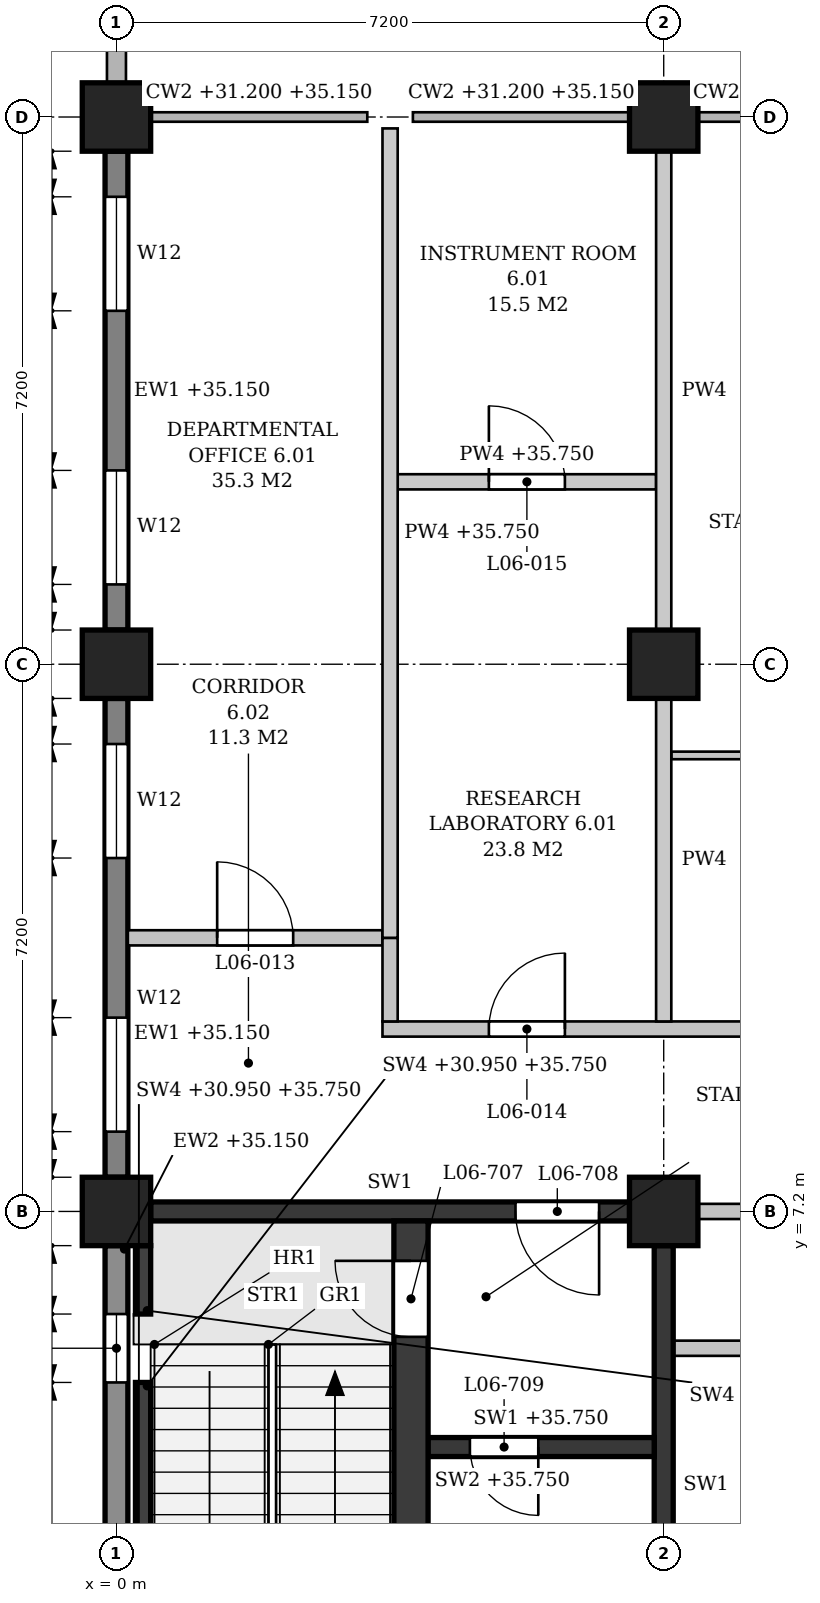
"""IFC4 building model, lengths in metres.
Left out: names, types, materials, properties, quantities, classifications, styles, units other than length and angle.
Written with IfcOpenShell. Run it as: python <this file> out.ifc"""

import sys

from ifc_helpers import new_model, si_unit, direction, frame, frame_2d, origin, origin_2d, place, context, subcontext, project, spatial, polyline, rectangle, outline, extrude, element, fill, save


model = new_model("IFC4")
c1 = context("Model", 3, precision=1e-05, world=origin(), true_north=direction((0.0, 1.0)))
c2 = subcontext(c1, "Body", "Model", "MODEL_VIEW")
j1 = project(units=[si_unit("LENGTHUNIT", "METRE"), si_unit("PLANEANGLEUNIT", "RADIAN")], contexts=[c1])
p1 = place(None, origin())
s1 = spatial("IfcSite", under=j1, at=p1, CompositionType="ELEMENT")
p2 = place(p1, origin())
s2 = spatial("IfcBuilding", under=s1, at=p2, CompositionType="ELEMENT")
p3 = place(p2, frame((0.0, 0.0, 31.2)))
s3 = spatial("IfcBuildingStorey", under=s2, at=p3, CompositionType="ELEMENT", Elevation=31.2)
for number, where, z_axis, x_axis in (
    (1, (0.0, 7.2, 0.0), (0.0, 0.0, 1.0), (1.0, 0.0, 0.0)),
    (2, (0.0, 14.4, 0.0), (0.0, 0.0, 1.0), (1.0, 0.0, 0.0)),
    (3, (0.0, 21.6, 0.0), (0.0, 0.0, 1.0), (1.0, 0.0, 0.0)),
    (4, (7.2, 7.2, 0.0), (0.0, 0.0, 1.0), (1.0, 0.0, 0.0)),
    (5, (7.2, 14.4, 0.0), (0.0, 0.0, 1.0), (1.0, 0.0, 0.0)),
    (6, (7.2, 21.6, 0.0), (0.0, 0.0, 1.0), (1.0, 0.0, 0.0)),
):
    element("IfcColumn", number, at=place(p3, frame(where, z_axis=z_axis, x_axis=x_axis)), inside=s3, PredefinedType="COLUMN", context=c2, shape_type="SweptSolid", body=[
        extrude(rectangle(XDim=0.9, YDim=0.9, at=origin_2d()), origin(), (0.0, 0.0, 1.0), 4.8),
    ])
p4 = place(p3, frame((0.0, 0.45, 0.0), z_axis=(0.0, 0.0, 1.0), x_axis=(0.0, 1.0, 0.0)))
e7 = element("IfcWall", 7, at=p4, inside=s3, PredefinedType="STANDARD", context=c2, shape_type="SweptSolid", body=[
    extrude(rectangle(XDim=6.3, YDim=0.3, at=frame_2d((3.15, 0.0))), origin(), (0.0, 0.0, 1.0), 3.95),
])
p5 = place(p4, frame((0.9, 0.0, 0.9)))
e8 = element("IfcOpeningElement", 8, at=p5, cuts=e7, PredefinedType="OPENING", context=c2, shape_type="SweptSolid", body=[
    extrude(outline(polyline([(0.0, 0.0), (0.9, 0.0), (0.9, 2.05), (0.45, 2.5), (0.0, 2.05), (0.0, 0.0)])), frame((0.0, 0.16, 0.0), z_axis=(0.0, -1.0, 0.0), x_axis=(1.0, 0.0, 0.0)), (0.0, 0.0, 1.0), 0.32),
])
p6 = place(p4, frame((4.5, 0.0, 0.9)))
e9 = element("IfcOpeningElement", 9, at=p6, cuts=e7, PredefinedType="OPENING", context=c2, shape_type="SweptSolid", body=[
    extrude(outline(polyline([(0.0, 0.0), (0.9, 0.0), (0.9, 2.05), (0.45, 2.5), (0.0, 2.05), (0.0, 0.0)])), frame((0.0, 0.16, 0.0), z_axis=(0.0, -1.0, 0.0), x_axis=(1.0, 0.0, 0.0)), (0.0, 0.0, 1.0), 0.32),
])
p7 = place(p3, frame((0.0, 7.65, 0.0), z_axis=(0.0, 0.0, 1.0), x_axis=(0.0, 1.0, 0.0)))
e10 = element("IfcWall", 10, at=p7, inside=s3, PredefinedType="STANDARD", context=c2, shape_type="SweptSolid", body=[
    extrude(rectangle(XDim=6.3, YDim=0.3, at=frame_2d((3.15, 0.0))), origin(), (0.0, 0.0, 1.0), 3.95),
])
p8 = place(p7, frame((0.6, 0.0, 0.9)))
e11 = element("IfcOpeningElement", 11, at=p8, cuts=e10, PredefinedType="OPENING", context=c2, shape_type="SweptSolid", body=[
    extrude(outline(polyline([(0.0, 0.0), (1.5, 0.0), (1.5, 1.75), (0.75, 2.5), (0.0, 1.75), (0.0, 0.0)])), frame((0.0, 0.16, 0.0), z_axis=(0.0, -1.0, 0.0), x_axis=(1.0, 0.0, 0.0)), (0.0, 0.0, 1.0), 0.32),
])
p9 = place(p7, frame((4.2, 0.0, 0.9)))
e12 = element("IfcOpeningElement", 12, at=p9, cuts=e10, PredefinedType="OPENING", context=c2, shape_type="SweptSolid", body=[
    extrude(outline(polyline([(0.0, 0.0), (1.5, 0.0), (1.5, 1.75), (0.75, 2.5), (0.0, 1.75), (0.0, 0.0)])), frame((0.0, 0.16, 0.0), z_axis=(0.0, -1.0, 0.0), x_axis=(1.0, 0.0, 0.0)), (0.0, 0.0, 1.0), 0.32),
])
p10 = place(p3, frame((0.0, 14.85, 0.0), z_axis=(0.0, 0.0, 1.0), x_axis=(0.0, 1.0, 0.0)))
e13 = element("IfcWall", 13, at=p10, inside=s3, PredefinedType="STANDARD", context=c2, shape_type="SweptSolid", body=[
    extrude(rectangle(XDim=6.3, YDim=0.3, at=frame_2d((3.15, 0.0))), origin(), (0.0, 0.0, 1.0), 3.95),
])
p11 = place(p10, frame((0.6, 0.0, 0.9)))
e14 = element("IfcOpeningElement", 14, at=p11, cuts=e13, PredefinedType="OPENING", context=c2, shape_type="SweptSolid", body=[
    extrude(outline(polyline([(0.0, 0.0), (1.5, 0.0), (1.5, 1.75), (0.75, 2.5), (0.0, 1.75), (0.0, 0.0)])), frame((0.0, 0.16, 0.0), z_axis=(0.0, -1.0, 0.0), x_axis=(1.0, 0.0, 0.0)), (0.0, 0.0, 1.0), 0.32),
])
p12 = place(p10, frame((4.2, 0.0, 0.9)))
e15 = element("IfcOpeningElement", 15, at=p12, cuts=e13, PredefinedType="OPENING", context=c2, shape_type="SweptSolid", body=[
    extrude(outline(polyline([(0.0, 0.0), (1.5, 0.0), (1.5, 1.75), (0.75, 2.5), (0.0, 1.75), (0.0, 0.0)])), frame((0.0, 0.16, 0.0), z_axis=(0.0, -1.0, 0.0), x_axis=(1.0, 0.0, 0.0)), (0.0, 0.0, 1.0), 0.32),
])
p13 = place(p3, frame((0.45, 7.2, 0.0), z_axis=(0.0, 0.0, 1.0), x_axis=(1.0, 0.0, 0.0)))
e16 = element("IfcWall", 16, at=p13, inside=s3, PredefinedType="SHEAR", context=c2, shape_type="SweptSolid", body=[
    extrude(rectangle(XDim=6.3, YDim=0.25, at=frame_2d((3.15, 0.0))), origin(), (0.0, 0.0, 1.0), 3.8),
])
p14 = place(p13, frame((4.8, 0.0, 0.0)))
e17 = element("IfcOpeningElement", 17, at=p14, cuts=e16, PredefinedType="OPENING", context=c2, shape_type="SweptSolid", body=[
    extrude(rectangle(XDim=1.1, YDim=2.1, at=frame_2d((0.55, 1.05))), frame((0.0, 0.135, 0.0), z_axis=(0.0, -1.0, 0.0), x_axis=(1.0, 0.0, 0.0)), (0.0, 0.0, 1.0), 0.27),
])
p15 = place(p3, frame((7.2, 0.45, 0.0), z_axis=(0.0, 0.0, 1.0), x_axis=(0.0, 1.0, 0.0)))
e18 = element("IfcWall", 18, at=p15, inside=s3, PredefinedType="SHEAR", context=c2, shape_type="SweptSolid", body=[
    extrude(rectangle(XDim=6.3, YDim=0.25, at=frame_2d((3.15, 0.0))), origin(), (0.0, 0.0, 1.0), 3.8),
])
p16 = place(p3, frame((0.35, 2.25, -0.25), z_axis=(0.0, 0.0, 1.0), x_axis=(0.0, 1.0, 0.0)))
e19 = element("IfcWall", 19, at=p16, inside=s3, PredefinedType="SHEAR", context=c2, shape_type="SweptSolid", body=[
    extrude(rectangle(XDim=2.7, YDim=0.2, at=frame_2d((1.35, 0.0))), origin(), (0.0, 0.0, 1.0), 4.8),
])
p17 = place(p3, frame((0.35, 5.85, -0.25), z_axis=(0.0, 0.0, 1.0), x_axis=(0.0, 1.0, 0.0)))
e20 = element("IfcWall", 20, at=p17, inside=s3, PredefinedType="SHEAR", context=c2, shape_type="SweptSolid", body=[
    extrude(rectangle(XDim=0.9, YDim=0.2, at=frame_2d((0.45, 0.0))), origin(), (0.0, 0.0, 1.0), 4.8),
])
p18 = place(p3, frame((3.875, 0.225, 0.0), z_axis=(0.0, 0.0, 1.0), x_axis=(0.0, 1.0, 0.0)))
e21 = element("IfcWall", 21, at=p18, inside=s3, PredefinedType="SHEAR", context=c2, shape_type="SweptSolid", body=[
    extrude(rectangle(XDim=6.85, YDim=0.45, at=frame_2d((3.425, 0.0))), origin(), (0.0, 0.0, 1.0), 4.55),
])
p19 = place(p18, frame((5.325, 0.0, 0.0)))
e22 = element("IfcOpeningElement", 22, at=p19, cuts=e21, PredefinedType="OPENING", context=c2, shape_type="SweptSolid", body=[
    extrude(rectangle(XDim=1.0, YDim=2.1, at=frame_2d((0.5, 1.05))), frame((0.0, 0.235, 0.0), z_axis=(0.0, -1.0, 0.0), x_axis=(1.0, 0.0, 0.0)), (0.0, 0.0, 1.0), 0.47),
])
p20 = place(p3, frame((4.1, 4.1, 0.0), z_axis=(0.0, 0.0, 1.0), x_axis=(1.0, 0.0, 0.0)))
e23 = element("IfcWall", 23, at=p20, inside=s3, PredefinedType="SHEAR", context=c2, shape_type="SweptSolid", body=[
    extrude(rectangle(XDim=2.975, YDim=0.25, at=frame_2d((1.487, 0.0))), origin(), (0.0, 0.0, 1.0), 4.55),
])
p21 = place(p20, frame((0.55, 0.0, 0.0)))
e24 = element("IfcOpeningElement", 24, at=p21, cuts=e23, PredefinedType="OPENING", context=c2, shape_type="SweptSolid", body=[
    extrude(rectangle(XDim=0.9, YDim=2.1, at=frame_2d((0.45, 1.05))), frame((0.0, 0.135, 0.0), z_axis=(0.0, -1.0, 0.0), x_axis=(1.0, 0.0, 0.0)), (0.0, 0.0, 1.0), 0.27),
])
p22 = place(p3, frame((7.325, 5.4, 0.0), z_axis=(0.0, 0.0, 1.0), x_axis=(1.0, 0.0, 0.0)))
e25 = element("IfcWall", 25, at=p22, inside=s3, PredefinedType="PARTITIONING", context=c2, shape_type="SweptSolid", body=[
    extrude(outline(polyline([(0.0, 0.0), (14.15, 0.0), (14.15, 3.8), (14.025, 3.8), (14.025, 4.55), (7.325, 4.55), (7.325, 3.8), (6.825, 3.8), (6.825, 4.55), (0.125, 4.55), (0.125, 3.8), (0.0, 3.8), (0.0, 0.0)])), frame((0.0, 0.1, 0.0), z_axis=(0.0, -1.0, 0.0), x_axis=(1.0, 0.0, 0.0)), (0.0, 0.0, 1.0), 0.2),
])
p23 = place(p22, frame((1.238, 0.0, 0.0)))
e26 = element("IfcOpeningElement", 26, at=p23, cuts=e25, PredefinedType="OPENING", context=c2, shape_type="SweptSolid", body=[
    extrude(rectangle(XDim=1.0, YDim=2.1, at=frame_2d((0.5, 1.05))), frame((0.0, 0.11, 0.0), z_axis=(0.0, -1.0, 0.0), x_axis=(1.0, 0.0, 0.0)), (0.0, 0.0, 1.0), 0.22),
])
p24 = place(p22, frame((4.775, 0.0, 0.0)))
e27 = element("IfcOpeningElement", 27, at=p24, cuts=e25, PredefinedType="OPENING", context=c2, shape_type="SweptSolid", body=[
    extrude(rectangle(XDim=1.0, YDim=2.1, at=frame_2d((0.5, 1.05))), frame((0.0, 0.11, 0.0), z_axis=(0.0, -1.0, 0.0), x_axis=(1.0, 0.0, 0.0)), (0.0, 0.0, 1.0), 0.22),
])
p25 = place(p22, frame((8.375, 0.0, 0.0)))
e28 = element("IfcOpeningElement", 28, at=p25, cuts=e25, PredefinedType="OPENING", context=c2, shape_type="SweptSolid", body=[
    extrude(rectangle(XDim=1.0, YDim=2.1, at=frame_2d((0.5, 1.05))), frame((0.0, 0.11, 0.0), z_axis=(0.0, -1.0, 0.0), x_axis=(1.0, 0.0, 0.0)), (0.0, 0.0, 1.0), 0.22),
])
p26 = place(p22, frame((11.913, 0.0, 0.0)))
e29 = element("IfcOpeningElement", 29, at=p26, cuts=e25, PredefinedType="OPENING", context=c2, shape_type="SweptSolid", body=[
    extrude(rectangle(XDim=1.0, YDim=2.1, at=frame_2d((0.5, 1.05))), frame((0.0, 0.11, 0.0), z_axis=(0.0, -1.0, 0.0), x_axis=(1.0, 0.0, 0.0)), (0.0, 0.0, 1.0), 0.22),
])
p27 = place(p3, frame((7.65, 7.2, 0.0), z_axis=(0.0, 0.0, 1.0), x_axis=(1.0, 0.0, 0.0)))
e30 = element("IfcWall", 30, at=p27, inside=s3, PredefinedType="PARTITIONING", context=c2, shape_type="SweptSolid", body=[
    extrude(rectangle(XDim=6.3, YDim=0.2, at=frame_2d((3.15, 0.0))), origin(), (0.0, 0.0, 1.0), 3.8),
])
p28 = place(p27, frame((2.65, 0.0, 0.0)))
e31 = element("IfcOpeningElement", 31, at=p28, cuts=e30, PredefinedType="OPENING", context=c2, shape_type="SweptSolid", body=[
    extrude(rectangle(XDim=1.0, YDim=2.1, at=frame_2d((0.5, 1.05))), frame((0.0, 0.11, 0.0), z_axis=(0.0, -1.0, 0.0), x_axis=(1.0, 0.0, 0.0)), (0.0, 0.0, 1.0), 0.22),
])
p29 = place(p3, frame((3.5, 9.6, 0.0), z_axis=(0.0, 0.0, 1.0), x_axis=(1.0, 0.0, 0.0)))
e32 = element("IfcWall", 32, at=p29, inside=s3, PredefinedType="PARTITIONING", context=c2, shape_type="SweptSolid", body=[
    extrude(outline(polyline([(0.0, 0.0), (14.6, 0.0), (14.6, 4.55), (11.15, 4.55), (11.15, 3.8), (10.65, 3.8), (10.65, 4.55), (3.95, 4.55), (3.95, 3.8), (3.45, 3.8), (3.45, 4.55), (0.0, 4.55), (0.0, 0.0)])), frame((0.0, 0.1, 0.0), z_axis=(0.0, -1.0, 0.0), x_axis=(1.0, 0.0, 0.0)), (0.0, 0.0, 1.0), 0.2),
])
p30 = place(p29, frame((1.4, 0.0, 0.0)))
e33 = element("IfcOpeningElement", 33, at=p30, cuts=e32, PredefinedType="OPENING", context=c2, shape_type="SweptSolid", body=[
    extrude(rectangle(XDim=1.0, YDim=2.1, at=frame_2d((0.5, 1.05))), frame((0.0, 0.11, 0.0), z_axis=(0.0, -1.0, 0.0), x_axis=(1.0, 0.0, 0.0)), (0.0, 0.0, 1.0), 0.22),
])
p31 = place(p29, frame((8.6, 0.0, 0.0)))
e34 = element("IfcOpeningElement", 34, at=p31, cuts=e32, PredefinedType="OPENING", context=c2, shape_type="SweptSolid", body=[
    extrude(rectangle(XDim=1.0, YDim=2.1, at=frame_2d((0.5, 1.05))), frame((0.0, 0.11, 0.0), z_axis=(0.0, -1.0, 0.0), x_axis=(1.0, 0.0, 0.0)), (0.0, 0.0, 1.0), 0.22),
])
p32 = place(p3, frame((0.15, 10.8, 0.0), z_axis=(0.0, 0.0, 1.0), x_axis=(1.0, 0.0, 0.0)))
e35 = element("IfcWall", 35, at=p32, inside=s3, PredefinedType="PARTITIONING", context=c2, shape_type="SweptSolid", body=[
    extrude(outline(polyline([(0.0, 0.0), (3.35, 0.0), (3.35, 4.55), (0.1, 4.55), (0.1, 3.95), (0.0, 3.95), (0.0, 0.0)])), frame((0.0, 0.1, 0.0), z_axis=(0.0, -1.0, 0.0), x_axis=(1.0, 0.0, 0.0)), (0.0, 0.0, 1.0), 0.2),
])
p33 = place(p32, frame((1.175, 0.0, 0.0)))
e36 = element("IfcOpeningElement", 36, at=p33, cuts=e35, PredefinedType="OPENING", context=c2, shape_type="SweptSolid", body=[
    extrude(rectangle(XDim=1.0, YDim=2.1, at=frame_2d((0.5, 1.05))), frame((0.0, 0.11, 0.0), z_axis=(0.0, -1.0, 0.0), x_axis=(1.0, 0.0, 0.0)), (0.0, 0.0, 1.0), 0.22),
])
p34 = place(p3, frame((7.3, 13.2, 0.0), z_axis=(0.0, 0.0, 1.0), x_axis=(1.0, 0.0, 0.0)))
e37 = element("IfcWall", 37, at=p34, inside=s3, PredefinedType="PARTITIONING", context=c2, shape_type="SweptSolid", body=[
    extrude(rectangle(XDim=10.6, YDim=0.1, at=frame_2d((5.3, 0.0))), origin(), (0.0, 0.0, 1.0), 3.8),
])
p35 = place(p34, frame((1.25, 0.0, 0.0)))
e38 = element("IfcOpeningElement", 38, at=p35, cuts=e37, PredefinedType="OPENING", context=c2, shape_type="SweptSolid", body=[
    extrude(rectangle(XDim=1.0, YDim=2.1, at=frame_2d((0.5, 1.05))), frame((0.0, 0.06, 0.0), z_axis=(0.0, -1.0, 0.0), x_axis=(1.0, 0.0, 0.0)), (0.0, 0.0, 1.0), 0.12),
])
p36 = place(p34, frame((4.8, 0.0, 0.0)))
e39 = element("IfcOpeningElement", 39, at=p36, cuts=e37, PredefinedType="OPENING", context=c2, shape_type="SweptSolid", body=[
    extrude(rectangle(XDim=1.0, YDim=2.1, at=frame_2d((0.5, 1.05))), frame((0.0, 0.06, 0.0), z_axis=(0.0, -1.0, 0.0), x_axis=(1.0, 0.0, 0.0)), (0.0, 0.0, 1.0), 0.12),
])
p37 = place(p34, frame((8.35, 0.0, 0.0)))
e40 = element("IfcOpeningElement", 40, at=p37, cuts=e37, PredefinedType="OPENING", context=c2, shape_type="SweptSolid", body=[
    extrude(rectangle(XDim=1.0, YDim=2.1, at=frame_2d((0.5, 1.05))), frame((0.0, 0.06, 0.0), z_axis=(0.0, -1.0, 0.0), x_axis=(1.0, 0.0, 0.0)), (0.0, 0.0, 1.0), 0.12),
])
p38 = place(p3, frame((3.7, 16.8, 0.0), z_axis=(0.0, 0.0, 1.0), x_axis=(1.0, 0.0, 0.0)))
e41 = element("IfcWall", 41, at=p38, inside=s3, PredefinedType="PARTITIONING", context=c2, shape_type="SweptSolid", body=[
    extrude(outline(polyline([(0.0, 0.0), (3.4, 0.0), (3.4, 3.8), (3.25, 3.8), (3.25, 4.55), (0.0, 4.55), (0.0, 0.0)])), frame((0.0, 0.1, 0.0), z_axis=(0.0, -1.0, 0.0), x_axis=(1.0, 0.0, 0.0)), (0.0, 0.0, 1.0), 0.2),
])
p39 = place(p38, frame((1.2, 0.0, 0.0)))
e42 = element("IfcOpeningElement", 42, at=p39, cuts=e41, PredefinedType="OPENING", context=c2, shape_type="SweptSolid", body=[
    extrude(rectangle(XDim=1.0, YDim=2.1, at=frame_2d((0.5, 1.05))), frame((0.0, 0.11, 0.0), z_axis=(0.0, -1.0, 0.0), x_axis=(1.0, 0.0, 0.0)), (0.0, 0.0, 1.0), 0.22),
])
p40 = place(p3, frame((3.6, 9.7, 0.0), z_axis=(0.0, 0.0, 1.0), x_axis=(0.0, 1.0, 0.0)))
e43 = element("IfcWall", 43, at=p40, inside=s3, PredefinedType="PARTITIONING", context=c2, shape_type="SweptSolid", body=[
    extrude(rectangle(XDim=1.1, YDim=0.2, at=frame_2d((0.55, 0.0))), origin(), (0.0, 0.0, 1.0), 4.55),
])
p41 = place(p3, frame((3.6, 10.8, 0.0), z_axis=(0.0, 0.0, 1.0), x_axis=(0.0, 1.0, 0.0)))
e44 = element("IfcWall", 44, at=p41, inside=s3, PredefinedType="PARTITIONING", context=c2, shape_type="SweptSolid", body=[
    extrude(outline(polyline([(0.0, 0.0), (10.65, 0.0), (10.65, 3.95), (10.55, 3.95), (10.55, 4.55), (3.85, 4.55), (3.85, 3.8), (3.35, 3.8), (3.35, 4.55), (0.0, 4.55), (0.0, 0.0)])), frame((0.0, 0.1, 0.0), z_axis=(0.0, -1.0, 0.0), x_axis=(1.0, 0.0, 0.0)), (0.0, 0.0, 1.0), 0.2),
])
p42 = place(p3, frame((7.2, 9.7, 0.0), z_axis=(0.0, 0.0, 1.0), x_axis=(0.0, 1.0, 0.0)))
e45 = element("IfcWall", 45, at=p42, inside=s3, PredefinedType="PARTITIONING", context=c2, shape_type="SweptSolid", body=[
    extrude(rectangle(XDim=4.25, YDim=0.2, at=frame_2d((2.125, 0.0))), origin(), (0.0, 0.0, 1.0), 3.8),
])
p43 = place(p3, frame((7.2, 14.85, 0.0), z_axis=(0.0, 0.0, 1.0), x_axis=(0.0, 1.0, 0.0)))
e46 = element("IfcWall", 46, at=p43, inside=s3, PredefinedType="PARTITIONING", context=c2, shape_type="SweptSolid", body=[
    extrude(rectangle(XDim=6.3, YDim=0.2, at=frame_2d((3.15, 0.0))), origin(), (0.0, 0.0, 1.0), 3.8),
])
p44 = place(p6, origin())
e47 = element("IfcWindow", 47, at=p44, inside=s3, PartitioningType="SINGLE_PANEL", PredefinedType="WINDOW", context=c2, shape_type="SweptSolid", body=[
    extrude(outline(polyline([(0.0, 0.0), (0.9, 0.0), (0.9, 2.05), (0.45, 2.5), (0.0, 2.05), (0.0, 0.0)])), frame((0.0, 0.03, 0.0), z_axis=(0.0, -1.0, 0.0), x_axis=(1.0, 0.0, 0.0)), (0.0, 0.0, 1.0), 0.06),
])
fill(e9, e47)
p45 = place(p8, origin())
e48 = element("IfcWindow", 48, at=p45, inside=s3, PartitioningType="SINGLE_PANEL", PredefinedType="WINDOW", context=c2, shape_type="SweptSolid", body=[
    extrude(outline(polyline([(0.0, 0.0), (1.5, 0.0), (1.5, 1.75), (0.75, 2.5), (0.0, 1.75), (0.0, 0.0)])), frame((0.0, 0.03, 0.0), z_axis=(0.0, -1.0, 0.0), x_axis=(1.0, 0.0, 0.0)), (0.0, 0.0, 1.0), 0.06),
])
fill(e11, e48)
p46 = place(p9, origin())
e49 = element("IfcWindow", 49, at=p46, inside=s3, PartitioningType="SINGLE_PANEL", PredefinedType="WINDOW", context=c2, shape_type="SweptSolid", body=[
    extrude(outline(polyline([(0.0, 0.0), (1.5, 0.0), (1.5, 1.75), (0.75, 2.5), (0.0, 1.75), (0.0, 0.0)])), frame((0.0, 0.03, 0.0), z_axis=(0.0, -1.0, 0.0), x_axis=(1.0, 0.0, 0.0)), (0.0, 0.0, 1.0), 0.06),
])
fill(e12, e49)
p47 = place(p11, origin())
e50 = element("IfcWindow", 50, at=p47, inside=s3, PartitioningType="SINGLE_PANEL", PredefinedType="WINDOW", context=c2, shape_type="SweptSolid", body=[
    extrude(outline(polyline([(0.0, 0.0), (1.5, 0.0), (1.5, 1.75), (0.75, 2.5), (0.0, 1.75), (0.0, 0.0)])), frame((0.0, 0.03, 0.0), z_axis=(0.0, -1.0, 0.0), x_axis=(1.0, 0.0, 0.0)), (0.0, 0.0, 1.0), 0.06),
])
fill(e14, e50)
p48 = place(p12, origin())
e51 = element("IfcWindow", 51, at=p48, inside=s3, PartitioningType="SINGLE_PANEL", PredefinedType="WINDOW", context=c2, shape_type="SweptSolid", body=[
    extrude(outline(polyline([(0.0, 0.0), (1.5, 0.0), (1.5, 1.75), (0.75, 2.5), (0.0, 1.75), (0.0, 0.0)])), frame((0.0, 0.03, 0.0), z_axis=(0.0, -1.0, 0.0), x_axis=(1.0, 0.0, 0.0)), (0.0, 0.0, 1.0), 0.06),
])
fill(e15, e51)
p49 = place(p19, origin())
e52 = element("IfcDoor", 52, at=p49, inside=s3, OperationType="SINGLE_SWING_RIGHT", PredefinedType="DOOR", context=c2, shape_type="SweptSolid", body=[
    extrude(rectangle(XDim=1.0, YDim=2.1, at=frame_2d((0.5, 1.05))), frame((0.0, 0.025, 0.0), z_axis=(0.0, -1.0, 0.0), x_axis=(1.0, 0.0, 0.0)), (0.0, 0.0, 1.0), 0.05),
])
fill(e22, e52)
p50 = place(p14, frame((1.1, 0.0, 0.0), z_axis=(0.0, 0.0, 1.0), x_axis=(-1.0, 0.0, 0.0)))
e53 = element("IfcDoor", 53, at=p50, inside=s3, OperationType="SINGLE_SWING_LEFT", PredefinedType="DOOR", context=c2, shape_type="SweptSolid", body=[
    extrude(rectangle(XDim=1.1, YDim=2.1, at=frame_2d((0.55, 1.05))), frame((0.0, 0.025, 0.0), z_axis=(0.0, -1.0, 0.0), x_axis=(1.0, 0.0, 0.0)), (0.0, 0.0, 1.0), 0.05),
])
fill(e17, e53)
p51 = place(p21, frame((0.9, 0.0, 0.0), z_axis=(0.0, 0.0, 1.0), x_axis=(-1.0, 0.0, 0.0)))
e54 = element("IfcDoor", 54, at=p51, inside=s3, OperationType="SINGLE_SWING_LEFT", PredefinedType="DOOR", context=c2, shape_type="SweptSolid", body=[
    extrude(rectangle(XDim=0.9, YDim=2.1, at=frame_2d((0.45, 1.05))), frame((0.0, 0.025, 0.0), z_axis=(0.0, -1.0, 0.0), x_axis=(1.0, 0.0, 0.0)), (0.0, 0.0, 1.0), 0.05),
])
fill(e24, e54)
p52 = place(p33, origin())
e55 = element("IfcDoor", 55, at=p52, inside=s3, OperationType="SINGLE_SWING_LEFT", PredefinedType="DOOR", context=c2, shape_type="SweptSolid", body=[
    extrude(rectangle(XDim=1.0, YDim=2.1, at=frame_2d((0.5, 1.05))), frame((0.0, 0.025, 0.0), z_axis=(0.0, -1.0, 0.0), x_axis=(1.0, 0.0, 0.0)), (0.0, 0.0, 1.0), 0.05),
])
fill(e36, e55)
p53 = place(p30, origin())
e56 = element("IfcDoor", 56, at=p53, inside=s3, OperationType="SINGLE_SWING_RIGHT", PredefinedType="DOOR", context=c2, shape_type="SweptSolid", body=[
    extrude(rectangle(XDim=1.0, YDim=2.1, at=frame_2d((0.5, 1.05))), frame((0.0, 0.025, 0.0), z_axis=(0.0, -1.0, 0.0), x_axis=(1.0, 0.0, 0.0)), (0.0, 0.0, 1.0), 0.05),
])
fill(e33, e56)
p54 = place(p39, origin())
e57 = element("IfcDoor", 57, at=p54, inside=s3, OperationType="SINGLE_SWING_LEFT", PredefinedType="DOOR", context=c2, shape_type="SweptSolid", body=[
    extrude(rectangle(XDim=1.0, YDim=2.1, at=frame_2d((0.5, 1.05))), frame((0.0, 0.025, 0.0), z_axis=(0.0, -1.0, 0.0), x_axis=(1.0, 0.0, 0.0)), (0.0, 0.0, 1.0), 0.05),
])
fill(e42, e57)
save(model, sys.argv[1])
